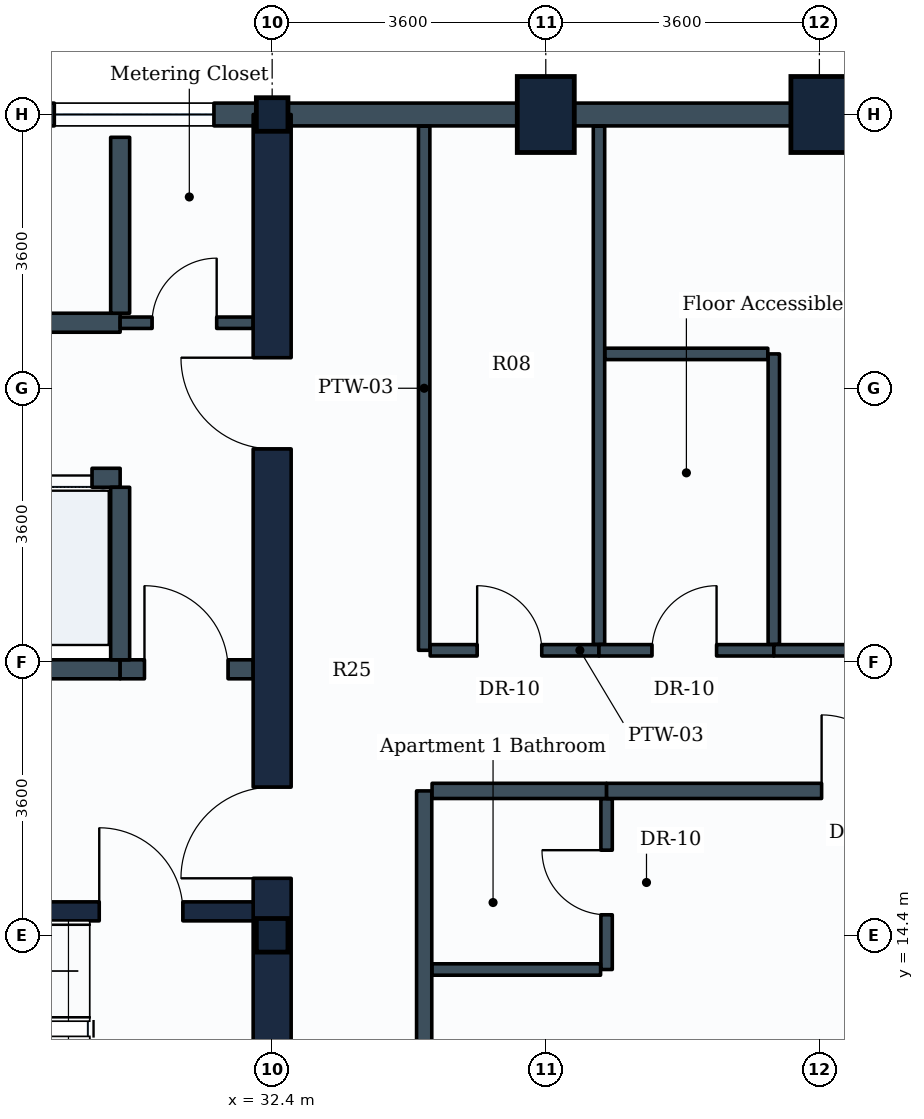
"""IFC4 building model, lengths in metres.
Left out: names, types, materials, properties, quantities, classifications, styles, units other than length and angle.
Written with IfcOpenShell. Run it as: python <this file> out.ifc"""

import sys

from ifc_helpers import new_model, si_unit, direction, frame, frame_2d, origin, origin_2d, place, context, subcontext, project, spatial, rectangle, i_section, extrude, element, fill, save


model = new_model("IFC4")
c1 = context("Model", 3, precision=1e-05, world=origin(), true_north=direction((0.0, 1.0)))
c2 = subcontext(c1, "Body", "Model", "MODEL_VIEW")
j1 = project(units=[si_unit("LENGTHUNIT", "METRE"), si_unit("PLANEANGLEUNIT", "RADIAN")], contexts=[c1])
p1 = place(None, origin())
s1 = spatial("IfcSite", under=j1, at=p1, CompositionType="ELEMENT")
p2 = place(p1, origin())
s2 = spatial("IfcBuilding", under=s1, at=p2, CompositionType="ELEMENT")
p3 = place(p2, frame((0.0, 0.0, 154.2)))
s3 = spatial("IfcBuildingStorey", under=s2, at=p3, CompositionType="ELEMENT", Elevation=154.2)
for number, where, z_axis, x_axis in (
    (1, (32.4, 14.4, 0.0), (0.0, 0.0, 1.0), (1.0, 0.0, 0.0)),
    (2, (32.4, 25.2, 0.0), (0.0, 0.0, 1.0), (1.0, 0.0, 0.0)),
):
    element("IfcColumn", number, at=place(p3, frame(where, z_axis=z_axis, x_axis=x_axis)), inside=s3, PredefinedType="COLUMN", context=c2, shape_type="SweptSolid", body=[
        extrude(i_section(OverallWidth=0.416, OverallDepth=0.442, WebThickness=0.025, FlangeThickness=0.041, FilletRadius=0.015, at=origin_2d()), origin(), (0.0, 0.0, 1.0), 3.8),
    ])
for number, where, z_axis, x_axis in (
    (3, (36.0, 25.2, 0.0), (0.0, 0.0, 1.0), (1.0, 0.0, 0.0)),
    (4, (39.6, 25.2, 0.0), (0.0, 0.0, 1.0), (1.0, 0.0, 0.0)),
):
    element("IfcColumn", number, at=place(p3, frame(where, z_axis=z_axis, x_axis=x_axis)), inside=s3, PredefinedType="COLUMN", context=c2, shape_type="SweptSolid", body=[
        extrude(rectangle(XDim=0.75, YDim=1.0, at=origin_2d()), origin(), (0.0, 0.0, 1.0), 3.8),
    ])
p4 = place(p3, frame((39.6, 25.2, 0.0), z_axis=(0.0, 0.0, 1.0), x_axis=(1.0, 0.0, 0.0)))
e5 = element("IfcWall", 5, at=p4, inside=s3, PredefinedType="STANDARD", context=c2, shape_type="SweptSolid", body=[
    extrude(rectangle(XDim=3.6, YDim=0.3, at=frame_2d((1.8, 0.0))), origin(), (0.0, 0.0, 1.0), 2.93),
])
p5 = place(p4, frame((0.75, 0.0, 0.85)))
e6 = element("IfcOpeningElement", 6, at=p5, cuts=e5, PredefinedType="OPENING", context=c2, shape_type="SweptSolid", body=[
    extrude(rectangle(XDim=2.1, YDim=1.35, at=frame_2d((1.05, 0.675))), frame((0.0, 0.16, 0.0), z_axis=(0.0, -1.0, 0.0), x_axis=(1.0, 0.0, 0.0)), (0.0, 0.0, 1.0), 0.32),
])
for number, where, z_axis, x_axis in (
    (7, (36.0, 25.2, 0.0), (0.0, 0.0, 1.0), (1.0, 0.0, 0.0)),
    (8, (32.4, 25.2, 0.0), (0.0, 0.0, 1.0), (1.0, 0.0, 0.0)),
):
    element("IfcWall", number, at=place(p3, frame(where, z_axis=z_axis, x_axis=x_axis)), inside=s3, PredefinedType="STANDARD", context=c2, shape_type="SweptSolid", body=[
        extrude(rectangle(XDim=3.6, YDim=0.3, at=frame_2d((1.8, 0.0))), origin(), (0.0, 0.0, 1.0), 2.93),
    ])
p6 = place(p3, frame((28.8, 25.2, 0.0), z_axis=(0.0, 0.0, 1.0), x_axis=(1.0, 0.0, 0.0)))
e9 = element("IfcWall", 9, at=p6, inside=s3, PredefinedType="STANDARD", context=c2, shape_type="SweptSolid", body=[
    extrude(rectangle(XDim=3.6, YDim=0.3, at=frame_2d((1.8, 0.0))), origin(), (0.0, 0.0, 1.0), 3.535),
])
p7 = place(p6, frame((0.734, 0.0, 0.85)))
e10 = element("IfcOpeningElement", 10, at=p7, cuts=e9, PredefinedType="OPENING", context=c2, shape_type="SweptSolid", body=[
    extrude(rectangle(XDim=2.1, YDim=1.35, at=frame_2d((1.05, 0.675))), frame((0.0, 0.16, 0.0), z_axis=(0.0, -1.0, 0.0), x_axis=(1.0, 0.0, 0.0)), (0.0, 0.0, 1.0), 0.32),
])
p8 = place(p3, frame((32.4, 10.8, 0.0), z_axis=(0.0, 0.0, 1.0), x_axis=(0.0, 1.0, 0.0)))
e11 = element("IfcWall", 11, at=p8, inside=s3, PredefinedType="SHEAR", context=c2, shape_type="SweptSolid", body=[
    extrude(rectangle(XDim=14.4, YDim=0.5, at=frame_2d((7.2, 0.0))), origin(), (0.0, 0.0, 1.0), 3.55),
])
p9 = place(p8, frame((4.35, 0.0, 0.0)))
e12 = element("IfcOpeningElement", 12, at=p9, cuts=e11, PredefinedType="OPENING", context=c2, shape_type="SweptSolid", body=[
    extrude(rectangle(XDim=1.2, YDim=2.1, at=frame_2d((0.6, 1.05))), frame((0.0, 0.26, 0.0), z_axis=(0.0, -1.0, 0.0), x_axis=(1.0, 0.0, 0.0)), (0.0, 0.0, 1.0), 0.52),
])
p10 = place(p8, frame((10.0, 0.0, 0.0)))
e13 = element("IfcOpeningElement", 13, at=p10, cuts=e11, PredefinedType="OPENING", context=c2, shape_type="SweptSolid", body=[
    extrude(rectangle(XDim=1.2, YDim=2.1, at=frame_2d((0.6, 1.05))), frame((0.0, 0.26, 0.0), z_axis=(0.0, -1.0, 0.0), x_axis=(1.0, 0.0, 0.0)), (0.0, 0.0, 1.0), 0.52),
])
p11 = place(p3, frame((23.35, 14.715, 0.0), z_axis=(0.0, 0.0, 1.0), x_axis=(1.0, 0.0, 0.0)))
e14 = element("IfcWall", 14, at=p11, inside=s3, PredefinedType="SHEAR", context=c2, shape_type="SweptSolid", body=[
    extrude(rectangle(XDim=8.8, YDim=0.25, at=frame_2d((4.4, 0.0))), origin(), (0.0, 0.0, 1.0), 3.55),
])
p12 = place(p11, frame((6.775, 0.0, 0.0)))
e15 = element("IfcOpeningElement", 15, at=p12, cuts=e14, PredefinedType="OPENING", context=c2, shape_type="SweptSolid", body=[
    extrude(rectangle(XDim=1.1, YDim=2.1, at=frame_2d((0.55, 1.05))), frame((0.0, 0.135, 0.0), z_axis=(0.0, -1.0, 0.0), x_axis=(1.0, 0.0, 0.0)), (0.0, 0.0, 1.0), 0.27),
])
p13 = place(p3, frame((21.88, 17.9, 0.0), z_axis=(0.0, 0.0, 1.0), x_axis=(1.0, 0.0, 0.0)))
e16 = element("IfcWall", 16, at=p13, inside=s3, PredefinedType="PARTITIONING", context=c2, shape_type="SweptSolid", body=[
    extrude(rectangle(XDim=8.52, YDim=0.25, at=frame_2d((4.26, 0.0))), origin(), (0.0, 0.0, 1.0), 3.535),
])
p14 = place(p3, frame((30.4, 17.9, 0.0), z_axis=(0.0, 0.0, 1.0), x_axis=(1.0, 0.0, 0.0)))
e17 = element("IfcWall", 17, at=p14, inside=s3, PredefinedType="PARTITIONING", context=c2, shape_type="SweptSolid", body=[
    extrude(rectangle(XDim=1.75, YDim=0.25, at=frame_2d((0.875, 0.0))), origin(), (0.0, 0.0, 1.0), 3.535),
])
p15 = place(p14, frame((0.32, 0.0, 0.0)))
e18 = element("IfcOpeningElement", 18, at=p15, cuts=e17, PredefinedType="OPENING", context=c2, shape_type="SweptSolid", body=[
    extrude(rectangle(XDim=1.1, YDim=2.1, at=frame_2d((0.55, 1.05))), frame((0.0, 0.135, 0.0), z_axis=(0.0, -1.0, 0.0), x_axis=(1.0, 0.0, 0.0)), (0.0, 0.0, 1.0), 0.27),
])
p16 = place(p3, frame((23.18, 20.42, 0.0), z_axis=(0.0, 0.0, 1.0), x_axis=(1.0, 0.0, 0.0)))
e19 = element("IfcWall", 19, at=p16, inside=s3, PredefinedType="PARTITIONING", context=c2, shape_type="SweptSolid", body=[
    extrude(rectangle(XDim=7.22, YDim=0.25, at=frame_2d((3.61, 0.0))), origin(), (0.0, 0.0, 1.0), 3.535),
])
p17 = place(p16, frame((0.41, 0.0, 0.0)))
e20 = element("IfcOpeningElement", 20, at=p17, cuts=e19, PredefinedType="OPENING", context=c2, shape_type="SweptSolid", body=[
    extrude(rectangle(XDim=1.1, YDim=2.1, at=frame_2d((0.55, 1.05))), frame((0.0, 0.135, 0.0), z_axis=(0.0, -1.0, 0.0), x_axis=(1.0, 0.0, 0.0)), (0.0, 0.0, 1.0), 0.27),
])
p18 = place(p16, frame((2.19, 0.0, 0.0)))
e21 = element("IfcOpeningElement", 21, at=p18, cuts=e19, PredefinedType="OPENING", context=c2, shape_type="SweptSolid", body=[
    extrude(rectangle(XDim=1.1, YDim=2.1, at=frame_2d((0.55, 1.05))), frame((0.0, 0.135, 0.0), z_axis=(0.0, -1.0, 0.0), x_axis=(1.0, 0.0, 0.0)), (0.0, 0.0, 1.0), 0.27),
])
p19 = place(p16, frame((3.97, 0.0, 0.0)))
e22 = element("IfcOpeningElement", 22, at=p19, cuts=e19, PredefinedType="OPENING", context=c2, shape_type="SweptSolid", body=[
    extrude(rectangle(XDim=1.1, YDim=2.1, at=frame_2d((0.55, 1.05))), frame((0.0, 0.135, 0.0), z_axis=(0.0, -1.0, 0.0), x_axis=(1.0, 0.0, 0.0)), (0.0, 0.0, 1.0), 0.27),
])
p20 = place(p16, frame((5.75, 0.0, 0.0)))
e23 = element("IfcOpeningElement", 23, at=p20, cuts=e19, PredefinedType="OPENING", context=c2, shape_type="SweptSolid", body=[
    extrude(rectangle(XDim=1.1, YDim=2.1, at=frame_2d((0.55, 1.05))), frame((0.0, 0.135, 0.0), z_axis=(0.0, -1.0, 0.0), x_axis=(1.0, 0.0, 0.0)), (0.0, 0.0, 1.0), 0.27),
])
p21 = place(p3, frame((30.4, 18.025, 0.0), z_axis=(0.0, 0.0, 1.0), x_axis=(0.0, 1.0, 0.0)))
e24 = element("IfcWall", 24, at=p21, inside=s3, PredefinedType="PARTITIONING", context=c2, shape_type="SweptSolid", body=[
    extrude(rectangle(XDim=2.27, YDim=0.25, at=frame_2d((1.135, 0.0))), origin(), (0.0, 0.0, 1.0), 3.535),
])
p22 = place(p3, frame((23.18, 22.46, 0.0), z_axis=(0.0, 0.0, 1.0), x_axis=(1.0, 0.0, 0.0)))
e25 = element("IfcWall", 25, at=p22, inside=s3, PredefinedType="PARTITIONING", context=c2, shape_type="SweptSolid", body=[
    extrude(rectangle(XDim=7.22, YDim=0.25, at=frame_2d((3.61, 0.0))), origin(), (0.0, 0.0, 1.0), 3.535),
])
p23 = place(p3, frame((30.4, 22.585, 0.0), z_axis=(0.0, 0.0, 1.0), x_axis=(0.0, 1.0, 0.0)))
e26 = element("IfcWall", 26, at=p23, inside=s3, PredefinedType="PARTITIONING", context=c2, shape_type="SweptSolid", body=[
    extrude(rectangle(XDim=2.315, YDim=0.25, at=frame_2d((1.157, 0.0))), origin(), (0.0, 0.0, 1.0), 3.535),
])
p24 = place(p3, frame((30.4, 22.46, 0.0), z_axis=(0.0, 0.0, 1.0), x_axis=(1.0, 0.0, 0.0)))
e27 = element("IfcWall", 27, at=p24, inside=s3, PredefinedType="PARTITIONING", context=c2, shape_type="SweptSolid", body=[
    extrude(rectangle(XDim=1.75, YDim=0.15, at=frame_2d((0.875, 0.0))), origin(), (0.0, 0.0, 1.0), 3.535),
])
p25 = place(p24, frame((0.42, 0.0, 0.0)))
e28 = element("IfcOpeningElement", 28, at=p25, cuts=e27, PredefinedType="OPENING", context=c2, shape_type="SweptSolid", body=[
    extrude(rectangle(XDim=0.85, YDim=2.1, at=frame_2d((0.425, 1.05))), frame((0.0, 0.085, 0.0), z_axis=(0.0, -1.0, 0.0), x_axis=(1.0, 0.0, 0.0)), (0.0, 0.0, 1.0), 0.17),
])
p26 = place(p3, frame((34.4, 18.15, 0.0), z_axis=(0.0, 0.0, 1.0), x_axis=(0.0, 1.0, 0.0)))
e29 = element("IfcWall", 29, at=p26, inside=s3, PredefinedType="PARTITIONING", context=c2, shape_type="SweptSolid", body=[
    extrude(rectangle(XDim=6.896, YDim=0.15, at=frame_2d((3.448, 0.0))), origin(), (0.0, 0.0, 1.0), 2.93),
])
p27 = place(p3, frame((34.479, 18.15, 0.0), z_axis=(0.0, 0.0, 1.0), x_axis=(1.0, 0.0, 0.0)))
e30 = element("IfcWall", 30, at=p27, inside=s3, PredefinedType="PARTITIONING", context=c2, shape_type="SweptSolid", body=[
    extrude(rectangle(XDim=2.221, YDim=0.15, at=frame_2d((1.11, 0.0))), origin(), (0.0, 0.0, 1.0), 3.17),
])
p28 = place(p27, frame((0.618, 0.0, 0.0)))
e31 = element("IfcOpeningElement", 31, at=p28, cuts=e30, PredefinedType="OPENING", context=c2, shape_type="SweptSolid", body=[
    extrude(rectangle(XDim=0.85, YDim=2.1, at=frame_2d((0.425, 1.05))), frame((0.0, 0.085, 0.0), z_axis=(0.0, -1.0, 0.0), x_axis=(1.0, 0.0, 0.0)), (0.0, 0.0, 1.0), 0.17),
])
p29 = place(p3, frame((36.7, 18.229, 0.0), z_axis=(0.0, 0.0, 1.0), x_axis=(0.0, 1.0, 0.0)))
e32 = element("IfcWall", 32, at=p29, inside=s3, PredefinedType="PARTITIONING", context=c2, shape_type="SweptSolid", body=[
    extrude(rectangle(XDim=6.817, YDim=0.15, at=frame_2d((3.408, 0.0))), origin(), (0.0, 0.0, 1.0), 2.93),
])
p30 = place(p3, frame((36.7, 18.15, 0.0), z_axis=(0.0, 0.0, 1.0), x_axis=(1.0, 0.0, 0.0)))
e33 = element("IfcWall", 33, at=p30, inside=s3, PredefinedType="PARTITIONING", context=c2, shape_type="SweptSolid", body=[
    extrude(rectangle(XDim=2.3, YDim=0.15, at=frame_2d((1.15, 0.0))), origin(), (0.0, 0.0, 1.0), 3.17),
])
p31 = place(p30, frame((0.697, 0.0, 0.0)))
e34 = element("IfcOpeningElement", 34, at=p31, cuts=e33, PredefinedType="OPENING", context=c2, shape_type="SweptSolid", body=[
    extrude(rectangle(XDim=0.85, YDim=2.1, at=frame_2d((0.425, 1.05))), frame((0.0, 0.085, 0.0), z_axis=(0.0, -1.0, 0.0), x_axis=(1.0, 0.0, 0.0)), (0.0, 0.0, 1.0), 0.17),
])
p32 = place(p3, frame((39.0, 18.229, 0.0), z_axis=(0.0, 0.0, 1.0), x_axis=(0.0, 1.0, 0.0)))
e35 = element("IfcWall", 35, at=p32, inside=s3, PredefinedType="PARTITIONING", context=c2, shape_type="SweptSolid", body=[
    extrude(rectangle(XDim=3.821, YDim=0.15, at=frame_2d((1.911, 0.0))), origin(), (0.0, 0.0, 1.0), 3.17),
])
p33 = place(p3, frame((36.779, 22.05, 0.0), z_axis=(0.0, 0.0, 1.0), x_axis=(1.0, 0.0, 0.0)))
e36 = element("IfcWall", 36, at=p33, inside=s3, PredefinedType="PARTITIONING", context=c2, shape_type="SweptSolid", body=[
    extrude(rectangle(XDim=2.142, YDim=0.15, at=frame_2d((1.071, 0.0))), origin(), (0.0, 0.0, 1.0), 3.535),
])
p34 = place(p3, frame((34.4, 3.754, 0.0), z_axis=(0.0, 0.0, 1.0), x_axis=(0.0, 1.0, 0.0)))
e37 = element("IfcWall", 37, at=p34, inside=s3, PredefinedType="PARTITIONING", context=c2, shape_type="SweptSolid", body=[
    extrude(rectangle(XDim=12.546, YDim=0.2, at=frame_2d((6.273, 0.0))), origin(), (0.0, 0.0, 1.0), 2.93),
])
p35 = place(p3, frame((34.504, 16.3, 0.0), z_axis=(0.0, 0.0, 1.0), x_axis=(1.0, 0.0, 0.0)))
e38 = element("IfcWall", 38, at=p35, inside=s3, PredefinedType="PARTITIONING", context=c2, shape_type="SweptSolid", body=[
    extrude(rectangle(XDim=2.296, YDim=0.2, at=frame_2d((1.148, 0.0))), origin(), (0.0, 0.0, 1.0), 3.22),
])
p36 = place(p3, frame((36.8, 13.95, 0.0), z_axis=(0.0, 0.0, 1.0), x_axis=(0.0, 1.0, 0.0)))
e39 = element("IfcWall", 39, at=p36, inside=s3, PredefinedType="PARTITIONING", context=c2, shape_type="SweptSolid", body=[
    extrude(rectangle(XDim=2.246, YDim=0.15, at=frame_2d((1.123, 0.0))), origin(), (0.0, 0.0, 1.0), 3.17),
])
p37 = place(p36, frame((0.72, 0.0, 0.0)))
e40 = element("IfcOpeningElement", 40, at=p37, cuts=e39, PredefinedType="OPENING", context=c2, shape_type="SweptSolid", body=[
    extrude(rectangle(XDim=0.85, YDim=2.1, at=frame_2d((0.425, 1.05))), frame((0.0, 0.085, 0.0), z_axis=(0.0, -1.0, 0.0), x_axis=(1.0, 0.0, 0.0)), (0.0, 0.0, 1.0), 0.17),
])
p38 = place(p3, frame((34.504, 13.95, 0.0), z_axis=(0.0, 0.0, 1.0), x_axis=(1.0, 0.0, 0.0)))
e41 = element("IfcWall", 41, at=p38, inside=s3, PredefinedType="PARTITIONING", context=c2, shape_type="SweptSolid", body=[
    extrude(rectangle(XDim=2.217, YDim=0.15, at=frame_2d((1.108, 0.0))), origin(), (0.0, 0.0, 1.0), 3.22),
])
p39 = place(p3, frame((36.8, 16.3, 0.0), z_axis=(0.0, 0.0, 1.0), x_axis=(1.0, 0.0, 0.0)))
e42 = element("IfcWall", 42, at=p39, inside=s3, PredefinedType="PARTITIONING", context=c2, shape_type="SweptSolid", body=[
    extrude(rectangle(XDim=8.146, YDim=0.2, at=frame_2d((4.073, 0.0))), origin(), (0.0, 0.0, 1.0), 3.17),
])
p40 = place(p39, frame((2.829, 0.0, 0.0)))
e43 = element("IfcOpeningElement", 43, at=p40, cuts=e42, PredefinedType="OPENING", context=c2, shape_type="SweptSolid", body=[
    extrude(rectangle(XDim=1.0, YDim=2.1, at=frame_2d((0.5, 1.05))), frame((0.0, 0.11, 0.0), z_axis=(0.0, -1.0, 0.0), x_axis=(1.0, 0.0, 0.0)), (0.0, 0.0, 1.0), 0.22),
])
p41 = place(p3, frame((39.0, 18.15, 0.0), z_axis=(0.0, 0.0, 1.0), x_axis=(1.0, 0.0, 0.0)))
e44 = element("IfcWall", 44, at=p41, inside=s3, PredefinedType="PARTITIONING", context=c2, shape_type="SweptSolid", body=[
    extrude(rectangle(XDim=7.396, YDim=0.15, at=frame_2d((3.698, 0.0))), origin(), (0.0, 0.0, 1.0), 3.17),
])
p42 = place(p41, frame((3.29, 0.0, 0.0)))
e45 = element("IfcOpeningElement", 45, at=p42, cuts=e44, PredefinedType="OPENING", context=c2, shape_type="SweptSolid", body=[
    extrude(rectangle(XDim=1.0, YDim=2.1, at=frame_2d((0.5, 1.05))), frame((0.0, 0.085, 0.0), z_axis=(0.0, -1.0, 0.0), x_axis=(1.0, 0.0, 0.0)), (0.0, 0.0, 1.0), 0.17),
])
p43 = place(p7, origin())
e46 = element("IfcWindow", 46, at=p43, inside=s3, PartitioningType="SINGLE_PANEL", PredefinedType="WINDOW", context=c2, shape_type="SweptSolid", body=[
    extrude(rectangle(XDim=2.1, YDim=1.35, at=frame_2d((1.05, 0.675))), frame((0.0, 0.03, 0.0), z_axis=(0.0, -1.0, 0.0), x_axis=(1.0, 0.0, 0.0)), (0.0, 0.0, 1.0), 0.06),
])
fill(e10, e46)
p44 = place(p12, origin())
e47 = element("IfcDoor", 47, at=p44, inside=s3, OperationType="SINGLE_SWING_LEFT", PredefinedType="DOOR", context=c2, shape_type="SweptSolid", body=[
    extrude(rectangle(XDim=1.1, YDim=2.1, at=frame_2d((0.55, 1.05))), frame((0.0, 0.025, 0.0), z_axis=(0.0, -1.0, 0.0), x_axis=(1.0, 0.0, 0.0)), (0.0, 0.0, 1.0), 0.05),
])
fill(e15, e47)
p45 = place(p9, origin())
e48 = element("IfcDoor", 48, at=p45, inside=s3, OperationType="SINGLE_SWING_LEFT", PredefinedType="DOOR", context=c2, shape_type="SweptSolid", body=[
    extrude(rectangle(XDim=1.2, YDim=2.1, at=frame_2d((0.6, 1.05))), frame((0.0, 0.025, 0.0), z_axis=(0.0, -1.0, 0.0), x_axis=(1.0, 0.0, 0.0)), (0.0, 0.0, 1.0), 0.05),
])
fill(e12, e48)
p46 = place(p15, origin())
e49 = element("IfcDoor", 49, at=p46, inside=s3, OperationType="SINGLE_SWING_LEFT", PredefinedType="DOOR", context=c2, shape_type="SweptSolid", body=[
    extrude(rectangle(XDim=1.1, YDim=2.1, at=frame_2d((0.55, 1.05))), frame((0.0, 0.025, 0.0), z_axis=(0.0, -1.0, 0.0), x_axis=(1.0, 0.0, 0.0)), (0.0, 0.0, 1.0), 0.05),
])
fill(e18, e49)
p47 = place(p20, origin())
e50 = element("IfcDoor", 50, at=p47, inside=s3, OperationType="SLIDING_TO_LEFT", PredefinedType="DOOR", context=c2, shape_type="SweptSolid", body=[
    extrude(rectangle(XDim=1.1, YDim=2.1, at=frame_2d((0.55, 1.05))), frame((0.0, 0.025, 0.0), z_axis=(0.0, -1.0, 0.0), x_axis=(1.0, 0.0, 0.0)), (0.0, 0.0, 1.0), 0.05),
])
fill(e23, e50)
p48 = place(p10, origin())
e51 = element("IfcDoor", 51, at=p48, inside=s3, OperationType="SINGLE_SWING_RIGHT", PredefinedType="DOOR", context=c2, shape_type="SweptSolid", body=[
    extrude(rectangle(XDim=1.2, YDim=2.1, at=frame_2d((0.6, 1.05))), frame((0.0, 0.025, 0.0), z_axis=(0.0, -1.0, 0.0), x_axis=(1.0, 0.0, 0.0)), (0.0, 0.0, 1.0), 0.05),
])
fill(e13, e51)
p49 = place(p25, origin())
e52 = element("IfcDoor", 52, at=p49, inside=s3, OperationType="SINGLE_SWING_RIGHT", PredefinedType="DOOR", context=c2, shape_type="SweptSolid", body=[
    extrude(rectangle(XDim=0.85, YDim=2.1, at=frame_2d((0.425, 1.05))), frame((0.0, 0.025, 0.0), z_axis=(0.0, -1.0, 0.0), x_axis=(1.0, 0.0, 0.0)), (0.0, 0.0, 1.0), 0.05),
])
fill(e28, e52)
p50 = place(p28, origin())
e53 = element("IfcDoor", 53, at=p50, inside=s3, OperationType="SINGLE_SWING_LEFT", PredefinedType="DOOR", context=c2, shape_type="SweptSolid", body=[
    extrude(rectangle(XDim=0.85, YDim=2.1, at=frame_2d((0.425, 1.05))), frame((0.0, 0.025, 0.0), z_axis=(0.0, -1.0, 0.0), x_axis=(1.0, 0.0, 0.0)), (0.0, 0.0, 1.0), 0.05),
])
fill(e31, e53)
p51 = place(p31, origin())
e54 = element("IfcDoor", 54, at=p51, inside=s3, OperationType="SINGLE_SWING_RIGHT", PredefinedType="DOOR", context=c2, shape_type="SweptSolid", body=[
    extrude(rectangle(XDim=0.85, YDim=2.1, at=frame_2d((0.425, 1.05))), frame((0.0, 0.025, 0.0), z_axis=(0.0, -1.0, 0.0), x_axis=(1.0, 0.0, 0.0)), (0.0, 0.0, 1.0), 0.05),
])
fill(e34, e54)
p52 = place(p37, origin())
e55 = element("IfcDoor", 55, at=p52, inside=s3, OperationType="SINGLE_SWING_RIGHT", PredefinedType="DOOR", context=c2, shape_type="SweptSolid", body=[
    extrude(rectangle(XDim=0.85, YDim=2.1, at=frame_2d((0.425, 1.05))), frame((0.0, 0.025, 0.0), z_axis=(0.0, -1.0, 0.0), x_axis=(1.0, 0.0, 0.0)), (0.0, 0.0, 1.0), 0.05),
])
fill(e40, e55)
p53 = place(p40, origin())
e56 = element("IfcDoor", 56, at=p53, inside=s3, OperationType="SINGLE_SWING_LEFT", PredefinedType="DOOR", context=c2, shape_type="SweptSolid", body=[
    extrude(rectangle(XDim=1.0, YDim=2.1, at=frame_2d((0.5, 1.05))), frame((0.0, 0.025, 0.0), z_axis=(0.0, -1.0, 0.0), x_axis=(1.0, 0.0, 0.0)), (0.0, 0.0, 1.0), 0.05),
])
fill(e43, e56)
save(model, sys.argv[1])
